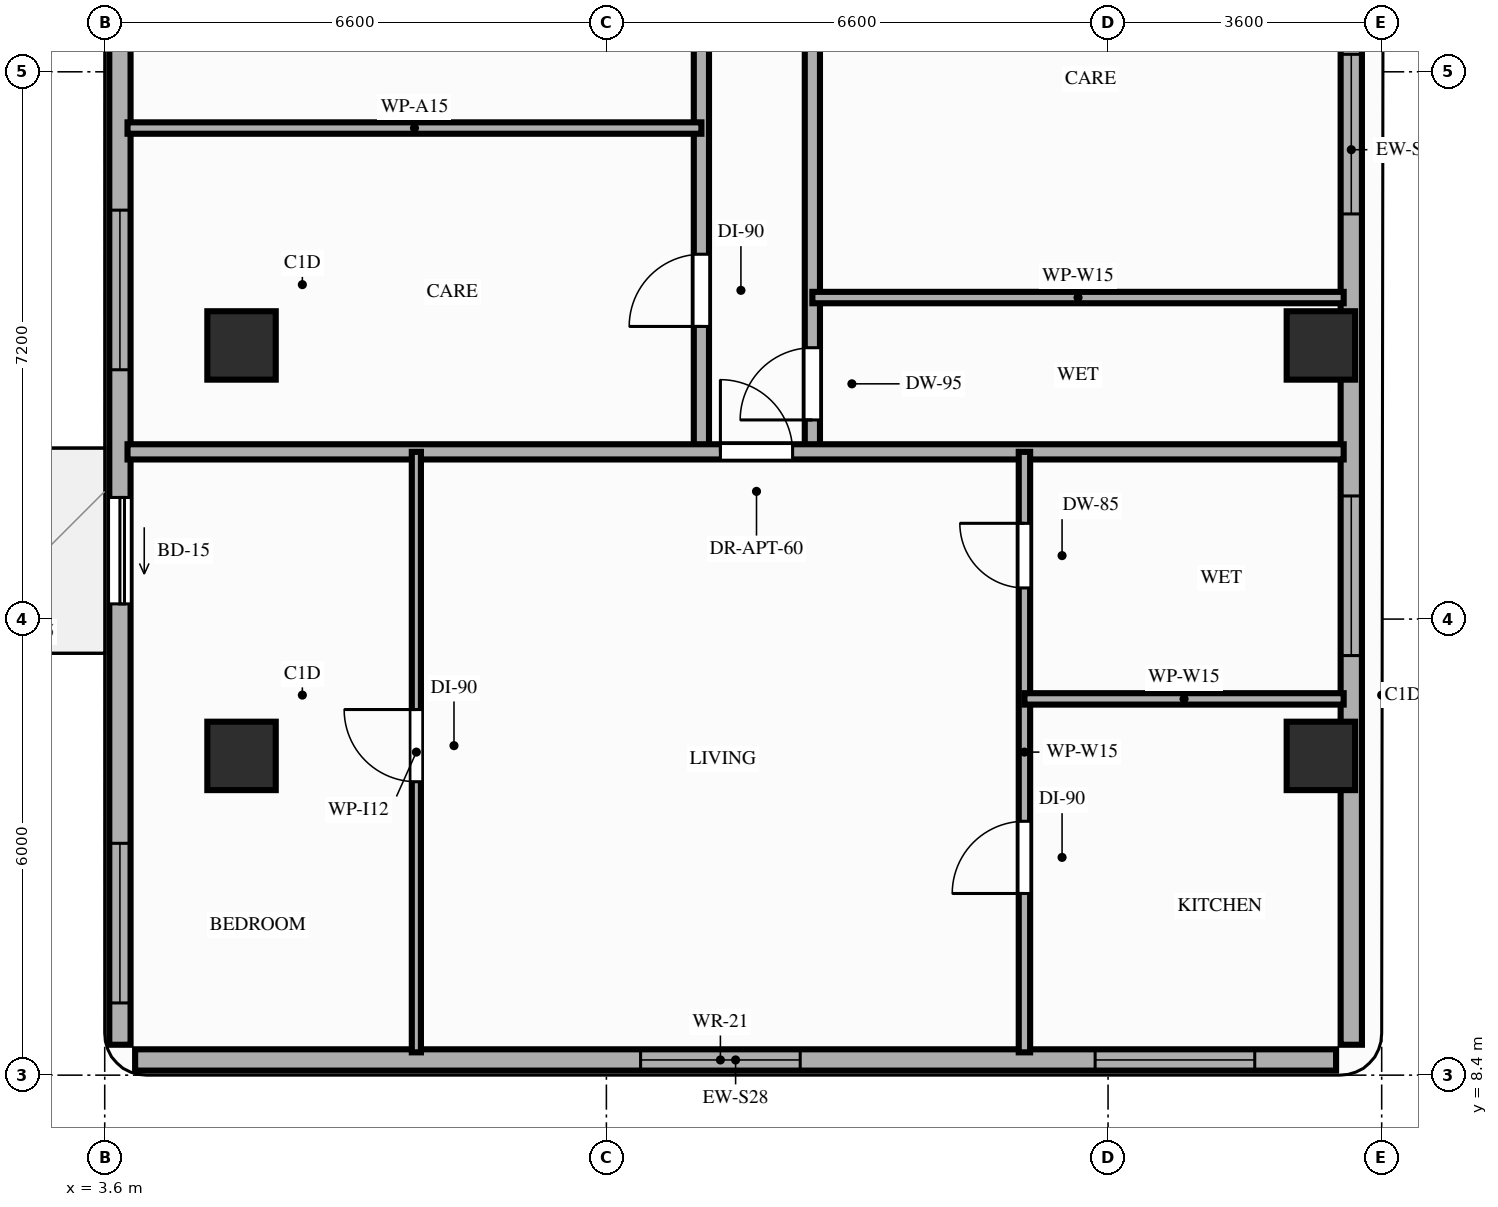
"""IFC4 building model, lengths in metres.
Left out: names, types, materials, properties, quantities, classifications, styles, units other than length and angle.
Written with IfcOpenShell. Run it as: python <this file> out.ifc"""

import sys

from ifc_helpers import new_model, si_unit, direction, frame, frame_2d, origin, origin_2d, place, context, subcontext, project, spatial, rectangle, extrude, element, fill, save


model = new_model("IFC4")
c1 = context("Model", 3, precision=1e-05, world=origin(), true_north=direction((0.0, 1.0)))
c2 = subcontext(c1, "Body", "Model", "MODEL_VIEW")
j1 = project(units=[si_unit("LENGTHUNIT", "METRE"), si_unit("PLANEANGLEUNIT", "RADIAN")], contexts=[c1])
p1 = place(None, origin())
s1 = spatial("IfcSite", under=j1, at=p1, CompositionType="ELEMENT")
p2 = place(p1, origin())
s2 = spatial("IfcBuilding", under=s1, at=p2, CompositionType="ELEMENT")
p3 = place(p2, frame((0.0, 0.0, 211.2)))
s3 = spatial("IfcBuildingStorey", under=s2, at=p3, CompositionType="ELEMENT", Elevation=211.2)
for number, where, z_axis, x_axis in (
    (1, (5.4, 12.6, 0.0), (0.0, 0.0, 1.0), (1.0, 0.0, 0.0)),
    (2, (19.6, 12.6, 0.0), (0.0, 0.0, 1.0), (1.0, 0.0, 0.0)),
    (3, (5.4, 18.0, 0.0), (0.0, 0.0, 1.0), (1.0, 0.0, 0.0)),
    (4, (19.6, 18.0, 0.0), (0.0, 0.0, 1.0), (1.0, 0.0, 0.0)),
):
    element("IfcColumn", number, at=place(p3, frame(where, z_axis=z_axis, x_axis=x_axis)), inside=s3, PredefinedType="COLUMN", context=c2, shape_type="SweptSolid", body=[
        extrude(rectangle(XDim=0.9, YDim=0.9, at=origin_2d()), origin(), (0.0, 0.0, 1.0), 3.2),
    ])
p4 = place(p3, frame((4.0, 8.6, 0.0), z_axis=(0.0, 0.0, 1.0), x_axis=(1.0, 0.0, 0.0)))
e5 = element("IfcWall", 5, at=p4, inside=s3, PredefinedType="STANDARD", context=c2, shape_type="SweptSolid", body=[
    extrude(rectangle(XDim=15.8, YDim=0.28, at=frame_2d((7.9, 0.0))), origin(), (0.0, 0.0, 1.0), 2.96),
])
p5 = place(p4, frame((6.65, 0.0, 0.85)))
e6 = element("IfcOpeningElement", 6, at=p5, cuts=e5, PredefinedType="OPENING", context=c2, shape_type="SweptSolid", body=[
    extrude(rectangle(XDim=2.1, YDim=1.8, at=frame_2d((1.05, 0.9))), frame((0.0, 0.15, 0.0), z_axis=(0.0, -1.0, 0.0), x_axis=(1.0, 0.0, 0.0)), (0.0, 0.0, 1.0), 0.3),
])
p6 = place(p4, frame((12.63, 0.0, 0.85)))
e7 = element("IfcOpeningElement", 7, at=p6, cuts=e5, PredefinedType="OPENING", context=c2, shape_type="SweptSolid", body=[
    extrude(rectangle(XDim=2.1, YDim=1.8, at=frame_2d((1.05, 0.9))), frame((0.0, 0.15, 0.0), z_axis=(0.0, -1.0, 0.0), x_axis=(1.0, 0.0, 0.0)), (0.0, 0.0, 1.0), 0.3),
])
p7 = place(p3, frame((3.8, 42.1, 0.0), z_axis=(0.0, 0.0, 1.0), x_axis=(0.0, -1.0, 0.0)))
e8 = element("IfcWall", 8, at=p7, inside=s3, PredefinedType="STANDARD", context=c2, shape_type="SweptSolid", body=[
    extrude(rectangle(XDim=33.3, YDim=0.28, at=frame_2d((16.65, 0.0))), origin(), (0.0, 0.0, 1.0), 2.96),
])
p8 = place(p7, frame((26.1, 0.0, 0.0)))
e9 = element("IfcOpeningElement", 9, at=p8, cuts=e8, PredefinedType="OPENING", context=c2, shape_type="SweptSolid", body=[
    extrude(rectangle(XDim=1.4, YDim=2.1, at=frame_2d((0.7, 1.05))), frame((0.0, 0.15, 0.0), z_axis=(0.0, -1.0, 0.0), x_axis=(1.0, 0.0, 0.0)), (0.0, 0.0, 1.0), 0.3),
])
p9 = place(p7, frame((15.3, 0.0, 0.0)))
e10 = element("IfcOpeningElement", 10, at=p9, cuts=e8, PredefinedType="OPENING", context=c2, shape_type="SweptSolid", body=[
    extrude(rectangle(XDim=1.4, YDim=2.1, at=frame_2d((0.7, 1.05))), frame((0.0, 0.15, 0.0), z_axis=(0.0, -1.0, 0.0), x_axis=(1.0, 0.0, 0.0)), (0.0, 0.0, 1.0), 0.3),
])
p10 = place(p7, frame((22.32, 0.0, 0.85)))
e11 = element("IfcOpeningElement", 11, at=p10, cuts=e8, PredefinedType="OPENING", context=c2, shape_type="SweptSolid", body=[
    extrude(rectangle(XDim=2.1, YDim=1.8, at=frame_2d((1.05, 0.9))), frame((0.0, 0.15, 0.0), z_axis=(0.0, -1.0, 0.0), x_axis=(1.0, 0.0, 0.0)), (0.0, 0.0, 1.0), 0.3),
])
p11 = place(p7, frame((30.65, 0.0, 0.85)))
e12 = element("IfcOpeningElement", 12, at=p11, cuts=e8, PredefinedType="OPENING", context=c2, shape_type="SweptSolid", body=[
    extrude(rectangle(XDim=2.1, YDim=1.8, at=frame_2d((1.05, 0.9))), frame((0.0, 0.15, 0.0), z_axis=(0.0, -1.0, 0.0), x_axis=(1.0, 0.0, 0.0)), (0.0, 0.0, 1.0), 0.3),
])
p12 = place(p7, frame((9.75, 0.0, 0.85)))
e13 = element("IfcOpeningElement", 13, at=p12, cuts=e8, PredefinedType="OPENING", context=c2, shape_type="SweptSolid", body=[
    extrude(rectangle(XDim=2.1, YDim=1.8, at=frame_2d((1.05, 0.9))), frame((0.0, 0.15, 0.0), z_axis=(0.0, -1.0, 0.0), x_axis=(1.0, 0.0, 0.0)), (0.0, 0.0, 1.0), 0.3),
])
p13 = place(p7, frame((3.65, 0.0, 0.85)))
e14 = element("IfcOpeningElement", 14, at=p13, cuts=e8, PredefinedType="OPENING", context=c2, shape_type="SweptSolid", body=[
    extrude(rectangle(XDim=2.1, YDim=1.8, at=frame_2d((1.05, 0.9))), frame((0.0, 0.15, 0.0), z_axis=(0.0, -1.0, 0.0), x_axis=(1.0, 0.0, 0.0)), (0.0, 0.0, 1.0), 0.3),
])
p14 = place(p3, frame((20.0, 8.8, 0.0), z_axis=(0.0, 0.0, 1.0), x_axis=(0.0, 1.0, 0.0)))
e15 = element("IfcWall", 15, at=p14, inside=s3, PredefinedType="STANDARD", context=c2, shape_type="SweptSolid", body=[
    extrude(rectangle(XDim=23.55, YDim=0.28, at=frame_2d((11.775, 0.0))), origin(), (0.0, 0.0, 1.0), 2.45),
])
p15 = place(p14, frame((20.86, 0.0, 0.85)))
e16 = element("IfcOpeningElement", 16, at=p15, cuts=e15, PredefinedType="OPENING", context=c2, shape_type="SweptSolid", body=[
    extrude(rectangle(XDim=1.1, YDim=1.35, at=frame_2d((0.55, 0.675))), frame((0.0, 0.15, 0.0), z_axis=(0.0, -1.0, 0.0), x_axis=(1.0, 0.0, 0.0)), (0.0, 0.0, 1.0), 0.3),
])
p16 = place(p14, frame((5.12, 0.0, 0.85)))
e17 = element("IfcOpeningElement", 17, at=p16, cuts=e15, PredefinedType="OPENING", context=c2, shape_type="SweptSolid", body=[
    extrude(rectangle(XDim=2.1, YDim=1.35, at=frame_2d((1.05, 0.675))), frame((0.0, 0.15, 0.0), z_axis=(0.0, -1.0, 0.0), x_axis=(1.0, 0.0, 0.0)), (0.0, 0.0, 1.0), 0.3),
])
p17 = place(p14, frame((10.93, 0.0, 0.85)))
e18 = element("IfcOpeningElement", 18, at=p17, cuts=e15, PredefinedType="OPENING", context=c2, shape_type="SweptSolid", body=[
    extrude(rectangle(XDim=2.1, YDim=1.35, at=frame_2d((1.05, 0.675))), frame((0.0, 0.15, 0.0), z_axis=(0.0, -1.0, 0.0), x_axis=(1.0, 0.0, 0.0)), (0.0, 0.0, 1.0), 0.3),
])
p18 = place(p3, frame((11.45, 16.6, 0.0), z_axis=(0.0, 0.0, 1.0), x_axis=(0.0, 1.0, 0.0)))
e19 = element("IfcWall", 19, at=p18, inside=s3, PredefinedType="PARTITIONING", context=c2, shape_type="SweptSolid", body=[
    extrude(rectangle(XDim=11.5, YDim=0.2, at=frame_2d((5.75, 0.0))), origin(), (0.0, 0.0, 1.0), 2.45),
])
p19 = place(p18, frame((1.65, 0.0, 0.0)))
e20 = element("IfcOpeningElement", 20, at=p19, cuts=e19, PredefinedType="OPENING", context=c2, shape_type="SweptSolid", body=[
    extrude(rectangle(XDim=0.95, YDim=2.15, at=frame_2d((0.475, 1.075))), frame((0.0, 0.11, 0.0), z_axis=(0.0, -1.0, 0.0), x_axis=(1.0, 0.0, 0.0)), (0.0, 0.0, 1.0), 0.22),
])
p20 = place(p18, frame((7.4, 0.0, 0.0)))
e21 = element("IfcOpeningElement", 21, at=p20, cuts=e19, PredefinedType="OPENING", context=c2, shape_type="SweptSolid", body=[
    extrude(rectangle(XDim=0.95, YDim=2.15, at=frame_2d((0.475, 1.075))), frame((0.0, 0.11, 0.0), z_axis=(0.0, -1.0, 0.0), x_axis=(1.0, 0.0, 0.0)), (0.0, 0.0, 1.0), 0.22),
])
p21 = place(p3, frame((12.91, 16.6, 0.0), z_axis=(0.0, 0.0, 1.0), x_axis=(0.0, 1.0, 0.0)))
e22 = element("IfcWall", 22, at=p21, inside=s3, PredefinedType="PARTITIONING", context=c2, shape_type="SweptSolid", body=[
    extrude(rectangle(XDim=11.5, YDim=0.2, at=frame_2d((5.75, 0.0))), origin(), (0.0, 0.0, 1.0), 2.45),
])
p22 = place(p21, frame((0.42, 0.0, 0.0)))
e23 = element("IfcOpeningElement", 23, at=p22, cuts=e22, PredefinedType="OPENING", context=c2, shape_type="SweptSolid", body=[
    extrude(rectangle(XDim=0.95, YDim=2.1, at=frame_2d((0.475, 1.05))), frame((0.0, 0.11, 0.0), z_axis=(0.0, -1.0, 0.0), x_axis=(1.0, 0.0, 0.0)), (0.0, 0.0, 1.0), 0.22),
])
p23 = place(p21, frame((6.29, 0.0, 0.0)))
e24 = element("IfcOpeningElement", 24, at=p23, cuts=e22, PredefinedType="OPENING", context=c2, shape_type="SweptSolid", body=[
    extrude(rectangle(XDim=0.95, YDim=2.15, at=frame_2d((0.475, 1.075))), frame((0.0, 0.11, 0.0), z_axis=(0.0, -1.0, 0.0), x_axis=(1.0, 0.0, 0.0)), (0.0, 0.0, 1.0), 0.22),
])
p24 = place(p3, frame((3.9, 16.6, 0.0), z_axis=(0.0, 0.0, 1.0), x_axis=(1.0, 0.0, 0.0)))
e25 = element("IfcWall", 25, at=p24, inside=s3, PredefinedType="PARTITIONING", context=c2, shape_type="SweptSolid", body=[
    extrude(rectangle(XDim=16.0, YDim=0.2, at=frame_2d((8.0, 0.0))), origin(), (0.0, 0.0, 1.0), 2.45),
])
p25 = place(p24, frame((7.8, 0.0, 0.0)))
e26 = element("IfcOpeningElement", 26, at=p25, cuts=e25, PredefinedType="OPENING", context=c2, shape_type="SweptSolid", body=[
    extrude(rectangle(XDim=0.95, YDim=2.15, at=frame_2d((0.475, 1.075))), frame((0.0, 0.11, 0.0), z_axis=(0.0, -1.0, 0.0), x_axis=(1.0, 0.0, 0.0)), (0.0, 0.0, 1.0), 0.22),
])
p26 = place(p3, frame((7.7, 8.7, 0.0), z_axis=(0.0, 0.0, 1.0), x_axis=(0.0, 1.0, 0.0)))
e27 = element("IfcWall", 27, at=p26, inside=s3, PredefinedType="PARTITIONING", context=c2, shape_type="SweptSolid", body=[
    extrude(rectangle(XDim=7.9, YDim=0.12, at=frame_2d((3.95, 0.0))), origin(), (0.0, 0.0, 1.0), 2.45),
])
p27 = place(p26, frame((3.56, 0.0, 0.0)))
e28 = element("IfcOpeningElement", 28, at=p27, cuts=e27, PredefinedType="OPENING", context=c2, shape_type="SweptSolid", body=[
    extrude(rectangle(XDim=0.95, YDim=2.15, at=frame_2d((0.475, 1.075))), frame((0.0, 0.07, 0.0), z_axis=(0.0, -1.0, 0.0), x_axis=(1.0, 0.0, 0.0)), (0.0, 0.0, 1.0), 0.14),
])
p28 = place(p3, frame((15.7, 8.7, 0.0), z_axis=(0.0, 0.0, 1.0), x_axis=(0.0, 1.0, 0.0)))
e29 = element("IfcWall", 29, at=p28, inside=s3, PredefinedType="PARTITIONING", context=c2, shape_type="SweptSolid", body=[
    extrude(rectangle(XDim=7.9, YDim=0.15, at=frame_2d((3.95, 0.0))), origin(), (0.0, 0.0, 1.0), 2.45),
])
p29 = place(p28, frame((2.09, 0.0, 0.0)))
e30 = element("IfcOpeningElement", 30, at=p29, cuts=e29, PredefinedType="OPENING", context=c2, shape_type="SweptSolid", body=[
    extrude(rectangle(XDim=0.95, YDim=2.15, at=frame_2d((0.475, 1.075))), frame((0.0, 0.085, 0.0), z_axis=(0.0, -1.0, 0.0), x_axis=(1.0, 0.0, 0.0)), (0.0, 0.0, 1.0), 0.17),
])
p30 = place(p28, frame((6.11, 0.0, 0.0)))
e31 = element("IfcOpeningElement", 31, at=p30, cuts=e29, PredefinedType="OPENING", context=c2, shape_type="SweptSolid", body=[
    extrude(rectangle(XDim=0.85, YDim=2.1, at=frame_2d((0.425, 1.05))), frame((0.0, 0.085, 0.0), z_axis=(0.0, -1.0, 0.0), x_axis=(1.0, 0.0, 0.0)), (0.0, 0.0, 1.0), 0.17),
])
p31 = place(p3, frame((15.7, 13.35, 0.0), z_axis=(0.0, 0.0, 1.0), x_axis=(1.0, 0.0, 0.0)))
e32 = element("IfcWall", 32, at=p31, inside=s3, PredefinedType="PARTITIONING", context=c2, shape_type="SweptSolid", body=[
    extrude(rectangle(XDim=4.2, YDim=0.15, at=frame_2d((2.1, 0.0))), origin(), (0.0, 0.0, 1.0), 2.45),
])
p32 = place(p3, frame((3.9, 20.86, 0.0), z_axis=(0.0, 0.0, 1.0), x_axis=(1.0, 0.0, 0.0)))
e33 = element("IfcWall", 33, at=p32, inside=s3, PredefinedType="PARTITIONING", context=c2, shape_type="SweptSolid", body=[
    extrude(rectangle(XDim=7.55, YDim=0.15, at=frame_2d((3.775, 0.0))), origin(), (0.0, 0.0, 1.0), 2.45),
])
p33 = place(p3, frame((12.91, 18.63, 0.0), z_axis=(0.0, 0.0, 1.0), x_axis=(1.0, 0.0, 0.0)))
e34 = element("IfcWall", 34, at=p33, inside=s3, PredefinedType="PARTITIONING", context=c2, shape_type="SweptSolid", body=[
    extrude(rectangle(XDim=6.99, YDim=0.15, at=frame_2d((3.495, 0.0))), origin(), (0.0, 0.0, 1.0), 2.45),
])
p34 = place(p8, origin())
e35 = element("IfcDoor", 35, at=p34, inside=s3, OperationType="SLIDING_TO_RIGHT", PredefinedType="DOOR", context=c2, shape_type="SweptSolid", body=[
    extrude(rectangle(XDim=1.4, YDim=2.1, at=frame_2d((0.7, 1.05))), frame((0.0, 0.025, 0.0), z_axis=(0.0, -1.0, 0.0), x_axis=(1.0, 0.0, 0.0)), (0.0, 0.0, 1.0), 0.05),
])
fill(e9, e35)
p35 = place(p5, origin())
e36 = element("IfcWindow", 36, at=p35, inside=s3, PartitioningType="SINGLE_PANEL", PredefinedType="WINDOW", context=c2, shape_type="SweptSolid", body=[
    extrude(rectangle(XDim=2.1, YDim=1.8, at=frame_2d((1.05, 0.9))), frame((0.0, 0.03, 0.0), z_axis=(0.0, -1.0, 0.0), x_axis=(1.0, 0.0, 0.0)), (0.0, 0.0, 1.0), 0.06),
])
fill(e6, e36)
p36 = place(p6, origin())
e37 = element("IfcWindow", 37, at=p36, inside=s3, PartitioningType="SINGLE_PANEL", PredefinedType="WINDOW", context=c2, shape_type="SweptSolid", body=[
    extrude(rectangle(XDim=2.1, YDim=1.8, at=frame_2d((1.05, 0.9))), frame((0.0, 0.03, 0.0), z_axis=(0.0, -1.0, 0.0), x_axis=(1.0, 0.0, 0.0)), (0.0, 0.0, 1.0), 0.06),
])
fill(e7, e37)
p37 = place(p16, origin())
e38 = element("IfcWindow", 38, at=p37, inside=s3, PartitioningType="SINGLE_PANEL", PredefinedType="WINDOW", context=c2, shape_type="SweptSolid", body=[
    extrude(rectangle(XDim=2.1, YDim=1.35, at=frame_2d((1.05, 0.675))), frame((0.0, 0.03, 0.0), z_axis=(0.0, -1.0, 0.0), x_axis=(1.0, 0.0, 0.0)), (0.0, 0.0, 1.0), 0.06),
])
fill(e17, e38)
p38 = place(p10, origin())
e39 = element("IfcWindow", 39, at=p38, inside=s3, PartitioningType="SINGLE_PANEL", PredefinedType="WINDOW", context=c2, shape_type="SweptSolid", body=[
    extrude(rectangle(XDim=2.1, YDim=1.8, at=frame_2d((1.05, 0.9))), frame((0.0, 0.03, 0.0), z_axis=(0.0, -1.0, 0.0), x_axis=(1.0, 0.0, 0.0)), (0.0, 0.0, 1.0), 0.06),
])
fill(e11, e39)
p39 = place(p17, origin())
e40 = element("IfcWindow", 40, at=p39, inside=s3, PartitioningType="SINGLE_PANEL", PredefinedType="WINDOW", context=c2, shape_type="SweptSolid", body=[
    extrude(rectangle(XDim=2.1, YDim=1.35, at=frame_2d((1.05, 0.675))), frame((0.0, 0.03, 0.0), z_axis=(0.0, -1.0, 0.0), x_axis=(1.0, 0.0, 0.0)), (0.0, 0.0, 1.0), 0.06),
])
fill(e18, e40)
p40 = place(p11, origin())
e41 = element("IfcWindow", 41, at=p40, inside=s3, PartitioningType="SINGLE_PANEL", PredefinedType="WINDOW", context=c2, shape_type="SweptSolid", body=[
    extrude(rectangle(XDim=2.1, YDim=1.8, at=frame_2d((1.05, 0.9))), frame((0.0, 0.03, 0.0), z_axis=(0.0, -1.0, 0.0), x_axis=(1.0, 0.0, 0.0)), (0.0, 0.0, 1.0), 0.06),
])
fill(e12, e41)
p41 = place(p25, origin())
e42 = element("IfcDoor", 42, at=p41, inside=s3, OperationType="SINGLE_SWING_LEFT", PredefinedType="DOOR", context=c2, shape_type="SweptSolid", body=[
    extrude(rectangle(XDim=0.95, YDim=2.15, at=frame_2d((0.475, 1.075))), frame((0.0, 0.025, 0.0), z_axis=(0.0, -1.0, 0.0), x_axis=(1.0, 0.0, 0.0)), (0.0, 0.0, 1.0), 0.05),
])
fill(e26, e42)
p42 = place(p27, origin())
e43 = element("IfcDoor", 43, at=p42, inside=s3, OperationType="SINGLE_SWING_RIGHT", PredefinedType="DOOR", context=c2, shape_type="SweptSolid", body=[
    extrude(rectangle(XDim=0.95, YDim=2.15, at=frame_2d((0.475, 1.075))), frame((0.0, 0.025, 0.0), z_axis=(0.0, -1.0, 0.0), x_axis=(1.0, 0.0, 0.0)), (0.0, 0.0, 1.0), 0.05),
])
fill(e28, e43)
p43 = place(p29, origin())
e44 = element("IfcDoor", 44, at=p43, inside=s3, OperationType="SINGLE_SWING_LEFT", PredefinedType="DOOR", context=c2, shape_type="SweptSolid", body=[
    extrude(rectangle(XDim=0.95, YDim=2.15, at=frame_2d((0.475, 1.075))), frame((0.0, 0.025, 0.0), z_axis=(0.0, -1.0, 0.0), x_axis=(1.0, 0.0, 0.0)), (0.0, 0.0, 1.0), 0.05),
])
fill(e30, e44)
p44 = place(p30, origin())
e45 = element("IfcDoor", 45, at=p44, inside=s3, OperationType="SINGLE_SWING_RIGHT", PredefinedType="DOOR", context=c2, shape_type="SweptSolid", body=[
    extrude(rectangle(XDim=0.85, YDim=2.1, at=frame_2d((0.425, 1.05))), frame((0.0, 0.025, 0.0), z_axis=(0.0, -1.0, 0.0), x_axis=(1.0, 0.0, 0.0)), (0.0, 0.0, 1.0), 0.05),
])
fill(e31, e45)
p45 = place(p19, origin())
e46 = element("IfcDoor", 46, at=p45, inside=s3, OperationType="SINGLE_SWING_LEFT", PredefinedType="DOOR", context=c2, shape_type="SweptSolid", body=[
    extrude(rectangle(XDim=0.95, YDim=2.15, at=frame_2d((0.475, 1.075))), frame((0.0, 0.025, 0.0), z_axis=(0.0, -1.0, 0.0), x_axis=(1.0, 0.0, 0.0)), (0.0, 0.0, 1.0), 0.05),
])
fill(e20, e46)
p46 = place(p22, origin())
e47 = element("IfcDoor", 47, at=p46, inside=s3, OperationType="SINGLE_SWING_LEFT", PredefinedType="DOOR", context=c2, shape_type="SweptSolid", body=[
    extrude(rectangle(XDim=0.95, YDim=2.1, at=frame_2d((0.475, 1.05))), frame((0.0, 0.025, 0.0), z_axis=(0.0, -1.0, 0.0), x_axis=(1.0, 0.0, 0.0)), (0.0, 0.0, 1.0), 0.05),
])
fill(e23, e47)
save(model, sys.argv[1])
